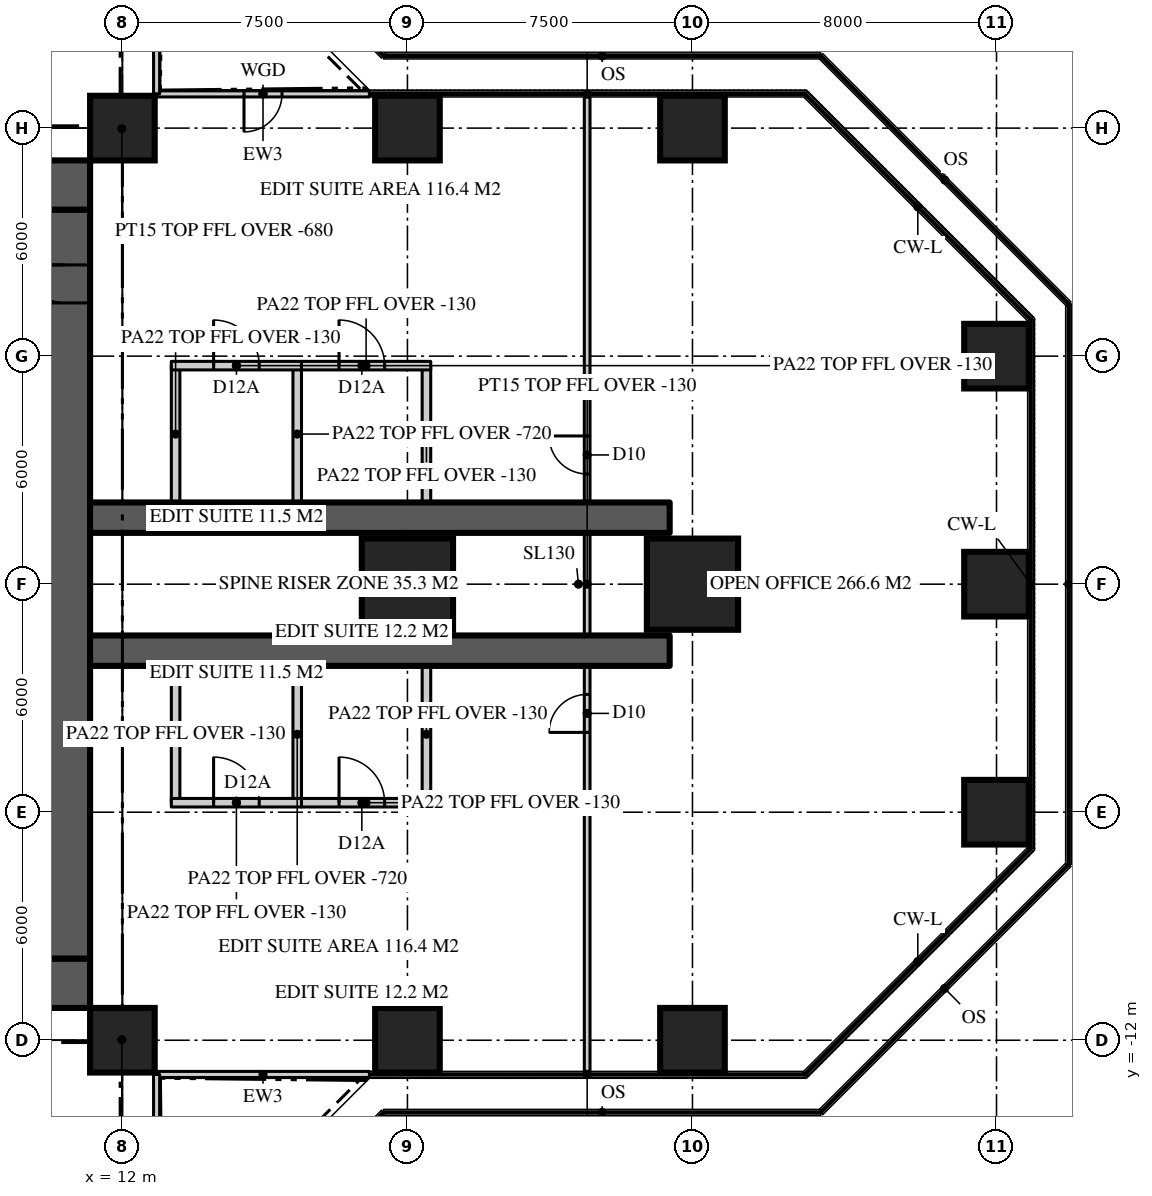
"""IFC4 building model, lengths in metres.
Left out: names, types, materials, properties, quantities, classifications, styles, units other than length and angle.
Written with IfcOpenShell. Run it as: python <this file> out.ifc"""

import sys

from ifc_helpers import new_model, si_unit, direction, frame, frame_2d, origin, origin_2d, place, context, subcontext, project, spatial, rectangle, extrude, element, fill, save


model = new_model("IFC4")
c1 = context("Model", 3, precision=1e-05, world=origin(), true_north=direction((0.0, 1.0)))
c2 = subcontext(c1, "Body", "Model", "MODEL_VIEW")
j1 = project(units=[si_unit("LENGTHUNIT", "METRE"), si_unit("PLANEANGLEUNIT", "RADIAN")], contexts=[c1])
p1 = place(None, origin())
s1 = spatial("IfcSite", under=j1, at=p1, CompositionType="ELEMENT")
p2 = place(p1, origin())
s2 = spatial("IfcBuilding", under=s1, at=p2, CompositionType="ELEMENT")
p3 = place(p2, frame((0.0, 0.0, 59.1)))
s3 = spatial("IfcBuildingStorey", under=s2, at=p3, CompositionType="ELEMENT", Elevation=59.1)
p4 = place(p3, frame((-11.15, 10.5, 0.0), z_axis=(0.0, 0.0, 1.0), x_axis=(1.0, 0.0, 0.0)))
e1 = element("IfcWall", 1, at=p4, inside=s3, PredefinedType="SHEAR", context=c2, shape_type="SweptSolid", body=[
    extrude(rectangle(XDim=22.3, YDim=1.3, at=frame_2d((11.15, 0.0))), origin(), (0.0, 0.0, 1.0), 3.9),
])
p5 = place(p4, frame((4.25, 0.0, 0.0)))
e2 = element("IfcOpeningElement", 2, at=p5, cuts=e1, PredefinedType="OPENING", context=c2, shape_type="SweptSolid", body=[
    extrude(rectangle(XDim=1.8, YDim=2.2, at=frame_2d((0.9, 1.1))), frame((0.0, 0.66, 0.0), z_axis=(0.0, -1.0, 0.0), x_axis=(1.0, 0.0, 0.0)), (0.0, 0.0, 1.0), 1.32),
])
p6 = place(p4, frame((16.25, 0.0, 0.0)))
e3 = element("IfcOpeningElement", 3, at=p6, cuts=e1, PredefinedType="OPENING", context=c2, shape_type="SweptSolid", body=[
    extrude(rectangle(XDim=1.8, YDim=2.2, at=frame_2d((0.9, 1.1))), frame((0.0, 0.66, 0.0), z_axis=(0.0, -1.0, 0.0), x_axis=(1.0, 0.0, 0.0)), (0.0, 0.0, 1.0), 1.32),
])
p7 = place(p3, frame((11.15, -10.5, 0.0), z_axis=(0.0, 0.0, 1.0), x_axis=(-1.0, 0.0, 0.0)))
e4 = element("IfcWall", 4, at=p7, inside=s3, PredefinedType="SHEAR", context=c2, shape_type="SweptSolid", body=[
    extrude(rectangle(XDim=22.3, YDim=1.3, at=frame_2d((11.15, 0.0))), origin(), (0.0, 0.0, 1.0), 3.9),
])
p8 = place(p7, frame((16.25, 0.0, 0.0)))
e5 = element("IfcOpeningElement", 5, at=p8, cuts=e4, PredefinedType="OPENING", context=c2, shape_type="SweptSolid", body=[
    extrude(rectangle(XDim=1.8, YDim=2.2, at=frame_2d((0.9, 1.1))), frame((0.0, 0.66, 0.0), z_axis=(0.0, -1.0, 0.0), x_axis=(1.0, 0.0, 0.0)), (0.0, 0.0, 1.0), 1.32),
])
p9 = place(p7, frame((4.25, 0.0, 0.0)))
e6 = element("IfcOpeningElement", 6, at=p9, cuts=e4, PredefinedType="OPENING", context=c2, shape_type="SweptSolid", body=[
    extrude(rectangle(XDim=1.8, YDim=2.2, at=frame_2d((0.9, 1.1))), frame((0.0, 0.66, 0.0), z_axis=(0.0, -1.0, 0.0), x_axis=(1.0, 0.0, 0.0)), (0.0, 0.0, 1.0), 1.32),
])
p10 = place(p3, frame((10.5, -9.85, 0.0), z_axis=(0.0, 0.0, 1.0), x_axis=(0.0, 1.0, 0.0)))
e7 = element("IfcWall", 7, at=p10, inside=s3, PredefinedType="SHEAR", context=c2, shape_type="SweptSolid", body=[
    extrude(rectangle(XDim=19.7, YDim=1.3, at=frame_2d((9.85, 0.0))), origin(), (0.0, 0.0, 1.0), 3.9),
])
p11 = place(p10, frame((17.25, 0.0, 0.0)))
e8 = element("IfcOpeningElement", 8, at=p11, cuts=e7, PredefinedType="OPENING", context=c2, shape_type="SweptSolid", body=[
    extrude(rectangle(XDim=1.0, YDim=2.2, at=frame_2d((0.5, 1.1))), frame((0.0, 0.66, 0.0), z_axis=(0.0, -1.0, 0.0), x_axis=(1.0, 0.0, 0.0)), (0.0, 0.0, 1.0), 1.32),
])
for number, where, z_axis, x_axis in (
    (9, (11.15, -1.75, 0.0), (0.0, 0.0, 1.0), (1.0, 0.0, 0.0)),
    (10, (11.15, 1.75, 0.0), (0.0, 0.0, 1.0), (1.0, 0.0, 0.0)),
):
    element("IfcWall", number, at=place(p3, frame(where, z_axis=z_axis, x_axis=x_axis)), inside=s3, PredefinedType="SHEAR", context=c2, shape_type="SweptSolid", body=[
        extrude(rectangle(XDim=15.25, YDim=0.8, at=frame_2d((7.625, 0.0))), origin(), (0.0, 0.0, 1.0), 3.9),
    ])
for number, where, z_axis, x_axis in (
    (11, (12.0, -12.0, 0.0), (0.0, 0.0, 1.0), (1.0, 0.0, 0.0)),
    (12, (19.5, -12.0, 0.0), (0.0, 0.0, 1.0), (1.0, 0.0, 0.0)),
    (13, (27.0, -12.0, 0.0), (0.0, 0.0, 1.0), (1.0, 0.0, 0.0)),
    (14, (35.0, -6.0, 0.0), (0.0, 0.0, 1.0), (1.0, 0.0, 0.0)),
):
    element("IfcColumn", number, at=place(p3, frame(where, z_axis=z_axis, x_axis=x_axis)), inside=s3, PredefinedType="COLUMN", context=c2, shape_type="SweptSolid", body=[
        extrude(rectangle(XDim=1.7, YDim=1.7, at=origin_2d()), origin(), (0.0, 0.0, 1.0), 3.9),
    ])
for number, where, z_axis, x_axis in (
    (15, (19.5, 0.0, 0.0), (0.0, 0.0, 1.0), (1.0, 0.0, 0.0)),
    (16, (27.0, 0.0, 0.0), (0.0, 0.0, 1.0), (1.0, 0.0, 0.0)),
):
    element("IfcColumn", number, at=place(p3, frame(where, z_axis=z_axis, x_axis=x_axis)), inside=s3, PredefinedType="COLUMN", context=c2, shape_type="SweptSolid", body=[
        extrude(rectangle(XDim=2.4, YDim=2.4, at=origin_2d()), origin(), (0.0, 0.0, 1.0), 3.9),
    ])
for number, where, z_axis, x_axis in (
    (17, (35.0, 0.0, 0.0), (0.0, 0.0, 1.0), (1.0, 0.0, 0.0)),
    (18, (35.0, 6.0, 0.0), (0.0, 0.0, 1.0), (1.0, 0.0, 0.0)),
    (19, (12.0, 12.0, 0.0), (0.0, 0.0, 1.0), (1.0, 0.0, 0.0)),
    (20, (19.5, 12.0, 0.0), (0.0, 0.0, 1.0), (1.0, 0.0, 0.0)),
    (21, (27.0, 12.0, 0.0), (0.0, 0.0, 1.0), (1.0, 0.0, 0.0)),
):
    element("IfcColumn", number, at=place(p3, frame(where, z_axis=z_axis, x_axis=x_axis)), inside=s3, PredefinedType="COLUMN", context=c2, shape_type="SweptSolid", body=[
        extrude(rectangle(XDim=1.7, YDim=1.7, at=origin_2d()), origin(), (0.0, 0.0, 1.0), 3.9),
    ])
p12 = place(p3, frame((12.9, -12.9, 0.0), z_axis=(0.0, 0.0, 1.0), x_axis=(1.0, 0.0, 0.0)))
e22 = element("IfcWall", 22, at=p12, inside=s3, PredefinedType="SOLIDWALL", context=c2, shape_type="SweptSolid", body=[
    extrude(rectangle(XDim=5.6, YDim=0.16, at=frame_2d((2.8, 0.0))), origin(), (0.0, 0.0, 1.0), 3.77),
])
p13 = place(p3, frame((18.5, 12.9, 0.0), z_axis=(0.0, 0.0, 1.0), x_axis=(-1.0, 0.0, 0.0)))
e23 = element("IfcWall", 23, at=p13, inside=s3, PredefinedType="SOLIDWALL", context=c2, shape_type="SweptSolid", body=[
    extrude(rectangle(XDim=5.6, YDim=0.16, at=frame_2d((2.8, 0.0))), origin(), (0.0, 0.0, 1.0), 3.77),
])
p14 = place(p13, frame((2.3, 0.0, 0.0)))
e24 = element("IfcOpeningElement", 24, at=p14, cuts=e23, PredefinedType="OPENING", context=c2, shape_type="SweptSolid", body=[
    extrude(rectangle(XDim=1.0, YDim=2.2, at=frame_2d((0.5, 1.1))), frame((0.0, 0.09, 0.0), z_axis=(0.0, -1.0, 0.0), x_axis=(1.0, 0.0, 0.0)), (0.0, 0.0, 1.0), 0.18),
])
p15 = place(p3, frame((12.9, 12.9, 0.0), z_axis=(0.0, 0.0, 1.0), x_axis=(0.0, 1.0, 0.0)))
e25 = element("IfcWall", 25, at=p15, inside=s3, PredefinedType="SOLIDWALL", context=c2, shape_type="SweptSolid", body=[
    extrude(rectangle(XDim=5.6, YDim=0.16, at=frame_2d((2.8, 0.0))), origin(), (0.0, 0.0, 1.0), 3.77),
])
p16 = place(p3, frame((12.9, -18.5, 0.0), z_axis=(0.0, 0.0, 1.0), x_axis=(0.0, 1.0, 0.0)))
e26 = element("IfcWall", 26, at=p16, inside=s3, PredefinedType="SOLIDWALL", context=c2, shape_type="SweptSolid", body=[
    extrude(rectangle(XDim=5.6, YDim=0.16, at=frame_2d((2.8, 0.0))), origin(), (0.0, 0.0, 1.0), 3.77),
])
p17 = place(p16, frame((2.3, 0.0, 0.0)))
e27 = element("IfcOpeningElement", 27, at=p17, cuts=e26, PredefinedType="OPENING", context=c2, shape_type="SweptSolid", body=[
    extrude(rectangle(XDim=1.0, YDim=2.2, at=frame_2d((0.5, 1.1))), frame((0.0, 0.09, 0.0), z_axis=(0.0, -1.0, 0.0), x_axis=(1.0, 0.0, 0.0)), (0.0, 0.0, 1.0), 0.18),
])
p18 = place(p3, frame((24.229, -12.82, 0.0), z_axis=(0.0, 0.0, 1.0), x_axis=(0.0, 1.0, 0.0)))
e28 = element("IfcWall", 28, at=p18, inside=s3, PredefinedType="PARTITIONING", context=c2, shape_type="SweptSolid", body=[
    extrude(rectangle(XDim=25.64, YDim=0.15, at=frame_2d((12.82, 0.0))), origin(), (0.0, 0.0, 1.0), 3.77),
])
p19 = place(p18, frame((15.72, 0.0, 0.0)))
e29 = element("IfcOpeningElement", 29, at=p19, cuts=e28, PredefinedType="OPENING", context=c2, shape_type="SweptSolid", body=[
    extrude(rectangle(XDim=1.0, YDim=2.2, at=frame_2d((0.5, 1.1))), frame((0.0, 0.085, 0.0), z_axis=(0.0, -1.0, 0.0), x_axis=(1.0, 0.0, 0.0)), (0.0, 0.0, 1.0), 0.17),
])
p20 = place(p18, frame((8.92, 0.0, 0.0)))
e30 = element("IfcOpeningElement", 30, at=p20, cuts=e28, PredefinedType="OPENING", context=c2, shape_type="SweptSolid", body=[
    extrude(rectangle(XDim=1.0, YDim=2.2, at=frame_2d((0.5, 1.1))), frame((0.0, 0.085, 0.0), z_axis=(0.0, -1.0, 0.0), x_axis=(1.0, 0.0, 0.0)), (0.0, 0.0, 1.0), 0.17),
])
p21 = place(p3, frame((13.4, 2.15, 0.0), z_axis=(0.0, 0.0, 1.0), x_axis=(0.0, 1.0, 0.0)))
e31 = element("IfcWall", 31, at=p21, inside=s3, PredefinedType="PARTITIONING", context=c2, shape_type="SweptSolid", body=[
    extrude(rectangle(XDim=3.6, YDim=0.225, at=frame_2d((1.8, 0.0))), origin(), (0.0, 0.0, 1.0), 3.77),
])
p22 = place(p3, frame((16.6, 2.15, 0.0), z_axis=(0.0, 0.0, 1.0), x_axis=(0.0, 1.0, 0.0)))
e32 = element("IfcWall", 32, at=p22, inside=s3, PredefinedType="PARTITIONING", context=c2, shape_type="SweptSolid", body=[
    extrude(rectangle(XDim=3.6, YDim=0.225, at=frame_2d((1.8, 0.0))), origin(), (0.0, 0.0, 1.0), 3.18),
])
p23 = place(p3, frame((13.288, 5.75, 0.0), z_axis=(0.0, 0.0, 1.0), x_axis=(1.0, 0.0, 0.0)))
e33 = element("IfcWall", 33, at=p23, inside=s3, PredefinedType="PARTITIONING", context=c2, shape_type="SweptSolid", body=[
    extrude(rectangle(XDim=3.425, YDim=0.225, at=frame_2d((1.712, 0.0))), origin(), (0.0, 0.0, 1.0), 3.77),
])
p24 = place(p23, frame((1.113, 0.0, 0.0)))
e34 = element("IfcOpeningElement", 34, at=p24, cuts=e33, PredefinedType="OPENING", context=c2, shape_type="SweptSolid", body=[
    extrude(rectangle(XDim=1.2, YDim=2.2, at=frame_2d((0.6, 1.1))), frame((0.0, 0.123, 0.0), z_axis=(0.0, -1.0, 0.0), x_axis=(1.0, 0.0, 0.0)), (0.0, 0.0, 1.0), 0.245),
])
p25 = place(p3, frame((20.0, 2.15, 0.0), z_axis=(0.0, 0.0, 1.0), x_axis=(0.0, 1.0, 0.0)))
e35 = element("IfcWall", 35, at=p25, inside=s3, PredefinedType="PARTITIONING", context=c2, shape_type="SweptSolid", body=[
    extrude(rectangle(XDim=3.6, YDim=0.225, at=frame_2d((1.8, 0.0))), origin(), (0.0, 0.0, 1.0), 3.77),
])
p26 = place(p3, frame((16.712, 5.75, 0.0), z_axis=(0.0, 0.0, 1.0), x_axis=(1.0, 0.0, 0.0)))
e36 = element("IfcWall", 36, at=p26, inside=s3, PredefinedType="PARTITIONING", context=c2, shape_type="SweptSolid", body=[
    extrude(rectangle(XDim=3.4, YDim=0.225, at=frame_2d((1.7, 0.0))), origin(), (0.0, 0.0, 1.0), 3.77),
])
p27 = place(p26, frame((0.988, 0.0, 0.0)))
e37 = element("IfcOpeningElement", 37, at=p27, cuts=e36, PredefinedType="OPENING", context=c2, shape_type="SweptSolid", body=[
    extrude(rectangle(XDim=1.2, YDim=2.2, at=frame_2d((0.6, 1.1))), frame((0.0, 0.123, 0.0), z_axis=(0.0, -1.0, 0.0), x_axis=(1.0, 0.0, 0.0)), (0.0, 0.0, 1.0), 0.245),
])
p28 = place(p3, frame((13.4, -2.15, 0.0), z_axis=(0.0, 0.0, 1.0), x_axis=(0.0, -1.0, 0.0)))
e38 = element("IfcWall", 38, at=p28, inside=s3, PredefinedType="PARTITIONING", context=c2, shape_type="SweptSolid", body=[
    extrude(rectangle(XDim=3.6, YDim=0.225, at=frame_2d((1.8, 0.0))), origin(), (0.0, 0.0, 1.0), 3.77),
])
p29 = place(p3, frame((16.6, -2.15, 0.0), z_axis=(0.0, 0.0, 1.0), x_axis=(0.0, -1.0, 0.0)))
e39 = element("IfcWall", 39, at=p29, inside=s3, PredefinedType="PARTITIONING", context=c2, shape_type="SweptSolid", body=[
    extrude(rectangle(XDim=3.6, YDim=0.225, at=frame_2d((1.8, 0.0))), origin(), (0.0, 0.0, 1.0), 3.18),
])
p30 = place(p3, frame((13.288, -5.75, 0.0), z_axis=(0.0, 0.0, 1.0), x_axis=(1.0, 0.0, 0.0)))
e40 = element("IfcWall", 40, at=p30, inside=s3, PredefinedType="PARTITIONING", context=c2, shape_type="SweptSolid", body=[
    extrude(rectangle(XDim=3.425, YDim=0.225, at=frame_2d((1.712, 0.0))), origin(), (0.0, 0.0, 1.0), 3.77),
])
p31 = place(p30, frame((1.113, 0.0, 0.0)))
e41 = element("IfcOpeningElement", 41, at=p31, cuts=e40, PredefinedType="OPENING", context=c2, shape_type="SweptSolid", body=[
    extrude(rectangle(XDim=1.2, YDim=2.2, at=frame_2d((0.6, 1.1))), frame((0.0, 0.123, 0.0), z_axis=(0.0, -1.0, 0.0), x_axis=(1.0, 0.0, 0.0)), (0.0, 0.0, 1.0), 0.245),
])
p32 = place(p3, frame((20.0, -2.15, 0.0), z_axis=(0.0, 0.0, 1.0), x_axis=(0.0, -1.0, 0.0)))
e42 = element("IfcWall", 42, at=p32, inside=s3, PredefinedType="PARTITIONING", context=c2, shape_type="SweptSolid", body=[
    extrude(rectangle(XDim=3.6, YDim=0.225, at=frame_2d((1.8, 0.0))), origin(), (0.0, 0.0, 1.0), 3.77),
])
p33 = place(p3, frame((16.712, -5.75, 0.0), z_axis=(0.0, 0.0, 1.0), x_axis=(1.0, 0.0, 0.0)))
e43 = element("IfcWall", 43, at=p33, inside=s3, PredefinedType="PARTITIONING", context=c2, shape_type="SweptSolid", body=[
    extrude(rectangle(XDim=3.4, YDim=0.225, at=frame_2d((1.7, 0.0))), origin(), (0.0, 0.0, 1.0), 3.77),
])
p34 = place(p33, frame((0.988, 0.0, 0.0)))
e44 = element("IfcOpeningElement", 44, at=p34, cuts=e43, PredefinedType="OPENING", context=c2, shape_type="SweptSolid", body=[
    extrude(rectangle(XDim=1.2, YDim=2.2, at=frame_2d((0.6, 1.1))), frame((0.0, 0.123, 0.0), z_axis=(0.0, -1.0, 0.0), x_axis=(1.0, 0.0, 0.0)), (0.0, 0.0, 1.0), 0.245),
])
for number, where, z_axis, x_axis in (
    (45, (11.15, 11.15, 0.0), (0.0, 0.0, 1.0), (0.707, 0.707, 0.0)),
    (46, (11.15, -11.15, 0.0), (0.0, 0.0, 1.0), (0.707, -0.707, 0.0)),
):
    element("IfcWall", number, at=place(p3, frame(where, z_axis=z_axis, x_axis=x_axis)), inside=s3, PredefinedType="PARTITIONING", context=c2, shape_type="SweptSolid", body=[
        extrude(rectangle(XDim=2.362, YDim=0.15, at=frame_2d((1.181, 0.0))), origin(), (0.0, 0.0, 1.0), 3.22),
    ])
p35 = place(p14, origin())
e47 = element("IfcDoor", 47, at=p35, inside=s3, OperationType="SINGLE_SWING_RIGHT", PredefinedType="DOOR", context=c2, shape_type="SweptSolid", body=[
    extrude(rectangle(XDim=1.0, YDim=2.2, at=frame_2d((0.5, 1.1))), frame((0.0, 0.025, 0.0), z_axis=(0.0, -1.0, 0.0), x_axis=(1.0, 0.0, 0.0)), (0.0, 0.0, 1.0), 0.05),
])
fill(e24, e47)
p36 = place(p11, origin())
e48 = element("IfcDoor", 48, at=p36, inside=s3, OperationType="SINGLE_SWING_RIGHT", PredefinedType="DOOR", context=c2, shape_type="SweptSolid", body=[
    extrude(rectangle(XDim=1.0, YDim=2.2, at=frame_2d((0.5, 1.1))), frame((0.0, 0.025, 0.0), z_axis=(0.0, -1.0, 0.0), x_axis=(1.0, 0.0, 0.0)), (0.0, 0.0, 1.0), 0.05),
])
fill(e8, e48)
p37 = place(p19, origin())
e49 = element("IfcDoor", 49, at=p37, inside=s3, OperationType="SINGLE_SWING_RIGHT", PredefinedType="DOOR", context=c2, shape_type="SweptSolid", body=[
    extrude(rectangle(XDim=1.0, YDim=2.2, at=frame_2d((0.5, 1.1))), frame((0.0, 0.025, 0.0), z_axis=(0.0, -1.0, 0.0), x_axis=(1.0, 0.0, 0.0)), (0.0, 0.0, 1.0), 0.05),
])
fill(e29, e49)
p38 = place(p20, origin())
e50 = element("IfcDoor", 50, at=p38, inside=s3, OperationType="SINGLE_SWING_LEFT", PredefinedType="DOOR", context=c2, shape_type="SweptSolid", body=[
    extrude(rectangle(XDim=1.0, YDim=2.2, at=frame_2d((0.5, 1.1))), frame((0.0, 0.025, 0.0), z_axis=(0.0, -1.0, 0.0), x_axis=(1.0, 0.0, 0.0)), (0.0, 0.0, 1.0), 0.05),
])
fill(e30, e50)
p39 = place(p24, origin())
e51 = element("IfcDoor", 51, at=p39, inside=s3, OperationType="SINGLE_SWING_LEFT", PredefinedType="DOOR", context=c2, shape_type="SweptSolid", body=[
    extrude(rectangle(XDim=1.2, YDim=2.2, at=frame_2d((0.6, 1.1))), frame((0.0, 0.025, 0.0), z_axis=(0.0, -1.0, 0.0), x_axis=(1.0, 0.0, 0.0)), (0.0, 0.0, 1.0), 0.05),
])
fill(e34, e51)
p40 = place(p27, origin())
e52 = element("IfcDoor", 52, at=p40, inside=s3, OperationType="SINGLE_SWING_LEFT", PredefinedType="DOOR", context=c2, shape_type="SweptSolid", body=[
    extrude(rectangle(XDim=1.2, YDim=2.2, at=frame_2d((0.6, 1.1))), frame((0.0, 0.025, 0.0), z_axis=(0.0, -1.0, 0.0), x_axis=(1.0, 0.0, 0.0)), (0.0, 0.0, 1.0), 0.05),
])
fill(e37, e52)
p41 = place(p31, origin())
e53 = element("IfcDoor", 53, at=p41, inside=s3, OperationType="SINGLE_SWING_LEFT", PredefinedType="DOOR", context=c2, shape_type="SweptSolid", body=[
    extrude(rectangle(XDim=1.2, YDim=2.2, at=frame_2d((0.6, 1.1))), frame((0.0, 0.025, 0.0), z_axis=(0.0, -1.0, 0.0), x_axis=(1.0, 0.0, 0.0)), (0.0, 0.0, 1.0), 0.05),
])
fill(e41, e53)
p42 = place(p34, origin())
e54 = element("IfcDoor", 54, at=p42, inside=s3, OperationType="SINGLE_SWING_LEFT", PredefinedType="DOOR", context=c2, shape_type="SweptSolid", body=[
    extrude(rectangle(XDim=1.2, YDim=2.2, at=frame_2d((0.6, 1.1))), frame((0.0, 0.025, 0.0), z_axis=(0.0, -1.0, 0.0), x_axis=(1.0, 0.0, 0.0)), (0.0, 0.0, 1.0), 0.05),
])
fill(e44, e54)
save(model, sys.argv[1])
